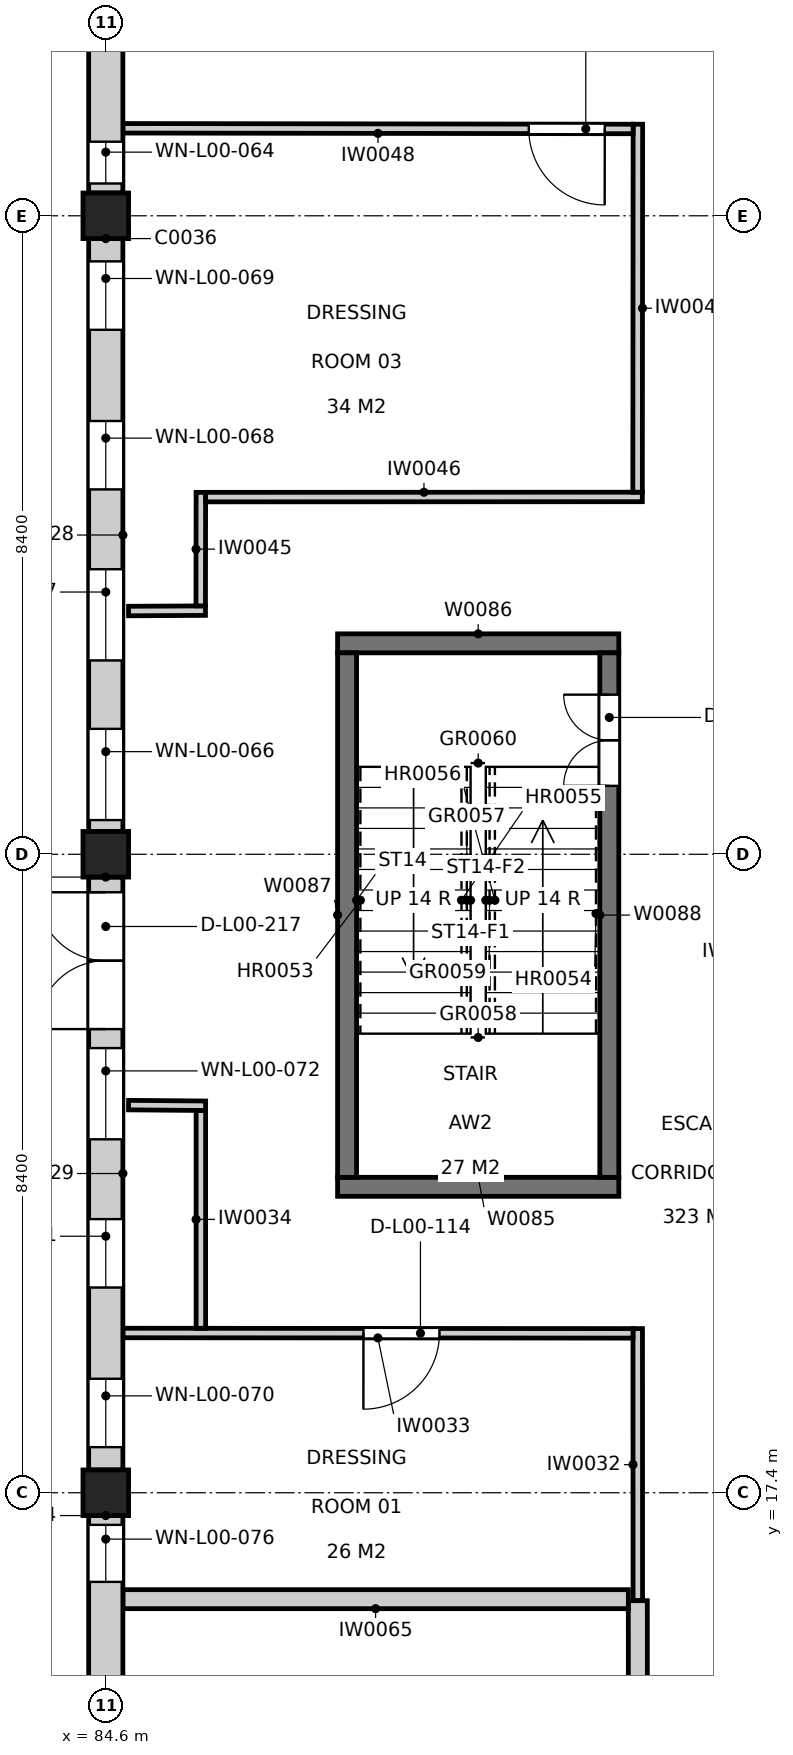
"""IFC4 building model, lengths in metres.
Left out: names, types, materials, properties, quantities, classifications, styles, units other than length and angle.
Written with IfcOpenShell. Run it as: python <this file> out.ifc"""

import sys

from ifc_helpers import new_model, si_unit, direction, frame, frame_2d, origin, origin_2d, place, context, subcontext, project, spatial, rectangle, extrude, element, fill, save


model = new_model("IFC4")
c1 = context("Model", 3, precision=1e-05, world=origin(), true_north=direction((0.0, 1.0)))
c2 = subcontext(c1, "Body", "Model", "MODEL_VIEW")
j1 = project(units=[si_unit("LENGTHUNIT", "METRE"), si_unit("PLANEANGLEUNIT", "RADIAN")], contexts=[c1])
p1 = place(None, origin())
s1 = spatial("IfcSite", under=j1, at=p1, CompositionType="ELEMENT")
p2 = place(p1, origin())
s2 = spatial("IfcBuilding", under=s1, at=p2, CompositionType="ELEMENT")
p3 = place(p2, origin())
s3 = spatial("IfcBuildingStorey", under=s2, at=p3, CompositionType="ELEMENT", Elevation=0.0)
for number, where, z_axis, x_axis in (
    (1, (84.6, 17.4, 0.0), (0.0, 0.0, 1.0), (1.0, 0.0, 0.0)),
    (2, (84.6, 25.8, 0.0), (0.0, 0.0, 1.0), (1.0, 0.0, 0.0)),
    (3, (84.6, 34.2, 0.0), (0.0, 0.0, 1.0), (1.0, 0.0, 0.0)),
):
    element("IfcColumn", number, at=place(p3, frame(where, z_axis=z_axis, x_axis=x_axis)), inside=s3, PredefinedType="COLUMN", context=c2, shape_type="SweptSolid", body=[
        extrude(rectangle(XDim=0.6, YDim=0.6, at=origin_2d()), origin(), (0.0, 0.0, 1.0), 4.8),
    ])
for number, where, z_axis, x_axis in (
    (4, (87.65, 21.425, 0.0), (0.0, 0.0, 1.0), (1.0, 0.0, 0.0)),
    (5, (87.65, 28.575, 0.0), (0.0, 0.0, 1.0), (1.0, 0.0, 0.0)),
):
    element("IfcWall", number, at=place(p3, frame(where, z_axis=z_axis, x_axis=x_axis)), inside=s3, PredefinedType="SOLIDWALL", context=c2, shape_type="SweptSolid", body=[
        extrude(rectangle(XDim=3.7, YDim=0.25, at=frame_2d((1.85, 0.0))), origin(), (0.0, 0.0, 1.0), 4.8),
    ])
p4 = place(p3, frame((87.775, 21.55, 0.0), z_axis=(0.0, 0.0, 1.0), x_axis=(0.0, 1.0, 0.0)))
e6 = element("IfcWall", 6, at=p4, inside=s3, PredefinedType="SOLIDWALL", context=c2, shape_type="SweptSolid", body=[
    extrude(rectangle(XDim=6.9, YDim=0.25, at=frame_2d((3.45, 0.0))), origin(), (0.0, 0.0, 1.0), 4.8),
])
p5 = place(p3, frame((91.225, 21.55, 0.0), z_axis=(0.0, 0.0, 1.0), x_axis=(0.0, 1.0, 0.0)))
e7 = element("IfcWall", 7, at=p5, inside=s3, PredefinedType="SOLIDWALL", context=c2, shape_type="SweptSolid", body=[
    extrude(rectangle(XDim=6.9, YDim=0.25, at=frame_2d((3.45, 0.0))), origin(), (0.0, 0.0, 1.0), 4.8),
])
p6 = place(p5, frame((5.15, 0.0, 0.0)))
e8 = element("IfcOpeningElement", 8, at=p6, cuts=e7, PredefinedType="OPENING", context=c2, shape_type="SweptSolid", body=[
    extrude(rectangle(XDim=1.2, YDim=2.1, at=frame_2d((0.6, 1.05))), frame((0.0, 0.135, 0.0), z_axis=(0.0, -1.0, 0.0), x_axis=(1.0, 0.0, 0.0)), (0.0, 0.0, 1.0), 0.27),
])
p7 = place(p3, frame((91.6, 15.98, 0.0), z_axis=(0.0, 0.0, 1.0), x_axis=(-0.000341017577, 0.999999941854, 0.0)))
e9 = element("IfcWall", 9, at=p7, inside=s3, PredefinedType="PARTITIONING", context=c2, shape_type="SweptSolid", body=[
    extrude(rectangle(XDim=3.58, YDim=0.125, at=frame_2d((1.79, 0.0))), origin(), (0.0, 0.0, 1.0), 3.84),
])
p8 = place(p3, frame((91.537, 19.497, 0.0), z_axis=(0.0, 0.0, 1.0), x_axis=(-0.999999761149, 0.000691160257, 0.0)))
e10 = element("IfcWall", 10, at=p8, inside=s3, PredefinedType="PARTITIONING", context=c2, shape_type="SweptSolid", body=[
    extrude(rectangle(XDim=6.711, YDim=0.125, at=frame_2d((3.356, 0.0))), origin(), (0.0, 0.0, 1.0), 4.64),
])
p9 = place(p8, frame((2.546, 0.0, 0.0)))
e11 = element("IfcOpeningElement", 11, at=p9, cuts=e10, PredefinedType="OPENING", context=c2, shape_type="SweptSolid", body=[
    extrude(rectangle(XDim=1.0, YDim=2.1, at=frame_2d((0.5, 1.05))), frame((0.0, 0.073, 0.0), z_axis=(0.0, -1.0, 0.0), x_axis=(1.0, 0.0, 0.0)), (0.0, 0.0, 1.0), 0.145),
])
p10 = place(p3, frame((85.851, 19.563, 0.0), z_axis=(0.0, 0.0, 1.0), x_axis=(0.0, 1.0, 0.0)))
e12 = element("IfcWall", 12, at=p10, inside=s3, PredefinedType="PARTITIONING", context=c2, shape_type="SweptSolid", body=[
    extrude(rectangle(XDim=2.866, YDim=0.125, at=frame_2d((1.433, 0.0))), origin(), (0.0, 0.0, 1.0), 3.94),
])
p11 = place(p3, frame((85.914, 22.491, 0.0), z_axis=(0.0, 0.0, 1.0), x_axis=(-0.999964472205, 0.008429372959, 0.0)))
e13 = element("IfcWall", 13, at=p11, inside=s3, PredefinedType="PARTITIONING", context=c2, shape_type="SweptSolid", body=[
    extrude(rectangle(XDim=1.014, YDim=0.125, at=frame_2d((0.507, 0.0))), origin(), (0.0, 0.0, 1.0), 4.64),
])
p12 = place(p3, frame((91.601, 12.634, 0.0), z_axis=(0.0, 0.0, 1.0), x_axis=(-0.000291864271, 0.999999957408, 0.0)))
e14 = element("IfcWall", 14, at=p12, inside=s3, PredefinedType="PARTITIONING", context=c2, shape_type="SweptSolid", body=[
    extrude(rectangle(XDim=3.346, YDim=0.25, at=frame_2d((1.673, 0.0))), origin(), (0.0, 0.0, 1.0), 3.94),
])
p13 = place(p3, frame((84.9, 29.0, 0.0), z_axis=(0.0, 0.0, 1.0), x_axis=(0.999985908193, 0.005308805497, 0.0)))
e15 = element("IfcWall", 15, at=p13, inside=s3, PredefinedType="PARTITIONING", context=c2, shape_type="SweptSolid", body=[
    extrude(rectangle(XDim=1.012, YDim=0.125, at=frame_2d((0.506, 0.0))), origin(), (0.0, 0.0, 1.0), 4.64),
])
p14 = place(p3, frame((85.849, 29.067, 0.0), z_axis=(0.0, 0.0, 1.0), x_axis=(0.001307188426, 0.999999145629, 0.0)))
e16 = element("IfcWall", 16, at=p14, inside=s3, PredefinedType="PARTITIONING", context=c2, shape_type="SweptSolid", body=[
    extrude(rectangle(XDim=1.494, YDim=0.125, at=frame_2d((0.747, 0.0))), origin(), (0.0, 0.0, 1.0), 4.64),
])
p15 = place(p3, frame((85.914, 30.499, 0.0), z_axis=(0.0, 0.0, 1.0), x_axis=(0.999999942227, 0.00033991925, 0.0)))
e17 = element("IfcWall", 17, at=p15, inside=s3, PredefinedType="PARTITIONING", context=c2, shape_type="SweptSolid", body=[
    extrude(rectangle(XDim=5.746, YDim=0.125, at=frame_2d((2.873, 0.0))), origin(), (0.0, 0.0, 1.0), 4.64),
])
p16 = place(p3, frame((91.597, 30.563, 0.0), z_axis=(0.0, 0.0, 1.0), x_axis=(0.000806898724, 0.999999674457, 0.0)))
e18 = element("IfcWall", 18, at=p16, inside=s3, PredefinedType="PARTITIONING", context=c2, shape_type="SweptSolid", body=[
    extrude(rectangle(XDim=4.841, YDim=0.125, at=frame_2d((2.42, 0.0))), origin(), (0.0, 0.0, 1.0), 3.84),
])
p17 = place(p3, frame((91.539, 35.342, 0.0), z_axis=(0.0, 0.0, 1.0), x_axis=(-0.999999094746, 0.001345551186, 0.0)))
e19 = element("IfcWall", 19, at=p17, inside=s3, PredefinedType="PARTITIONING", context=c2, shape_type="SweptSolid", body=[
    extrude(rectangle(XDim=6.713, YDim=0.125, at=frame_2d((3.357, 0.0))), origin(), (0.0, 0.0, 1.0), 4.64),
])
p18 = place(p17, frame((0.373, 0.0, 0.0)))
e20 = element("IfcOpeningElement", 20, at=p18, cuts=e19, PredefinedType="OPENING", context=c2, shape_type="SweptSolid", body=[
    extrude(rectangle(XDim=1.0, YDim=2.1, at=frame_2d((0.5, 1.05))), frame((0.0, 0.073, 0.0), z_axis=(0.0, -1.0, 0.0), x_axis=(1.0, 0.0, 0.0)), (0.0, 0.0, 1.0), 0.145),
])
p19 = place(p3, frame((91.475, 16.0, 0.0), z_axis=(0.0, 0.0, 1.0), x_axis=(-1.0, 0.0, 0.0)))
e21 = element("IfcWall", 21, at=p19, inside=s3, PredefinedType="PARTITIONING", context=c2, shape_type="SweptSolid", body=[
    extrude(rectangle(XDim=6.65, YDim=0.25, at=frame_2d((3.325, 0.0))), origin(), (0.0, 0.0, 1.0), 4.64),
])
p20 = place(p3, frame((84.6, 42.3, 0.0), z_axis=(0.0, 0.0, 1.0), x_axis=(0.0, -1.0, 0.0)))
e22 = element("IfcWall", 22, at=p20, inside=s3, PredefinedType="SOLIDWALL", context=c2, shape_type="SweptSolid", body=[
    extrude(rectangle(XDim=7.8, YDim=0.45, at=frame_2d((3.9, 0.0))), origin(), (0.0, 0.0, 1.0), 3.84),
])
p21 = place(p20, frame((2.4, 0.0, 0.0)))
e23 = element("IfcOpeningElement", 23, at=p21, cuts=e22, PredefinedType="OPENING", context=c2, shape_type="SweptSolid", body=[
    extrude(rectangle(XDim=1.8, YDim=2.1, at=frame_2d((0.9, 1.05))), frame((0.0, 0.235, 0.0), z_axis=(0.0, -1.0, 0.0), x_axis=(1.0, 0.0, 0.0)), (0.0, 0.0, 1.0), 0.47),
])
p22 = place(p20, frame((7.125, 0.0, 1.8)))
e24 = element("IfcOpeningElement", 24, at=p22, cuts=e22, PredefinedType="OPENING", context=c2, shape_type="SweptSolid", body=[
    extrude(rectangle(XDim=0.55, YDim=0.6, at=frame_2d((0.275, 0.3))), frame((0.0, 0.235, 0.0), z_axis=(0.0, -1.0, 0.0), x_axis=(1.0, 0.0, 0.0)), (0.0, 0.0, 1.0), 0.47),
])
p23 = place(p20, frame((0.15, 0.0, 0.9)))
e25 = element("IfcOpeningElement", 25, at=p23, cuts=e22, PredefinedType="OPENING", context=c2, shape_type="SweptSolid", body=[
    extrude(rectangle(XDim=1.2, YDim=2.4, at=frame_2d((0.6, 1.2))), frame((0.0, 0.235, 0.0), z_axis=(0.0, -1.0, 0.0), x_axis=(1.0, 0.0, 0.0)), (0.0, 0.0, 1.0), 0.47),
])
p24 = place(p3, frame((84.6, 33.9, 0.0), z_axis=(0.0, 0.0, 1.0), x_axis=(0.0, -1.0, 0.0)))
e26 = element("IfcWall", 26, at=p24, inside=s3, PredefinedType="SOLIDWALL", context=c2, shape_type="SweptSolid", body=[
    extrude(rectangle(XDim=7.8, YDim=0.45, at=frame_2d((3.9, 0.0))), origin(), (0.0, 0.0, 1.0), 3.84),
])
p25 = place(p24, frame((6.45, 0.0, 0.9)))
e27 = element("IfcOpeningElement", 27, at=p25, cuts=e26, PredefinedType="OPENING", context=c2, shape_type="SweptSolid", body=[
    extrude(rectangle(XDim=1.2, YDim=2.4, at=frame_2d((0.6, 1.2))), frame((0.0, 0.235, 0.0), z_axis=(0.0, -1.0, 0.0), x_axis=(1.0, 0.0, 0.0)), (0.0, 0.0, 1.0), 0.47),
])
p26 = place(p24, frame((4.35, 0.0, 0.9)))
e28 = element("IfcOpeningElement", 28, at=p26, cuts=e26, PredefinedType="OPENING", context=c2, shape_type="SweptSolid", body=[
    extrude(rectangle(XDim=1.2, YDim=2.4, at=frame_2d((0.6, 1.2))), frame((0.0, 0.235, 0.0), z_axis=(0.0, -1.0, 0.0), x_axis=(1.0, 0.0, 0.0)), (0.0, 0.0, 1.0), 0.47),
])
p27 = place(p24, frame((2.4, 0.0, 1.8)))
e29 = element("IfcOpeningElement", 29, at=p27, cuts=e26, PredefinedType="OPENING", context=c2, shape_type="SweptSolid", body=[
    extrude(rectangle(XDim=0.9, YDim=0.6, at=frame_2d((0.45, 0.3))), frame((0.0, 0.235, 0.0), z_axis=(0.0, -1.0, 0.0), x_axis=(1.0, 0.0, 0.0)), (0.0, 0.0, 1.0), 0.47),
])
p28 = place(p24, frame((0.3, 0.0, 1.8)))
e30 = element("IfcOpeningElement", 30, at=p28, cuts=e26, PredefinedType="OPENING", context=c2, shape_type="SweptSolid", body=[
    extrude(rectangle(XDim=0.9, YDim=0.6, at=frame_2d((0.45, 0.3))), frame((0.0, 0.235, 0.0), z_axis=(0.0, -1.0, 0.0), x_axis=(1.0, 0.0, 0.0)), (0.0, 0.0, 1.0), 0.47),
])
p29 = place(p3, frame((84.6, 25.5, 0.0), z_axis=(0.0, 0.0, 1.0), x_axis=(0.0, -1.0, 0.0)))
e31 = element("IfcWall", 31, at=p29, inside=s3, PredefinedType="SOLIDWALL", context=c2, shape_type="SweptSolid", body=[
    extrude(rectangle(XDim=7.8, YDim=0.45, at=frame_2d((3.9, 0.0))), origin(), (0.0, 0.0, 1.0), 3.84),
])
p30 = place(p29, frame((2.0, 0.0, 0.0), z_axis=(0.0, 0.0, 1.0), x_axis=(-1.0, 0.0, 0.0)))
e32 = element("IfcOpeningElement", 32, at=p30, cuts=e31, PredefinedType="OPENING", context=c2, shape_type="SweptSolid", body=[
    extrude(rectangle(XDim=1.8, YDim=2.1, at=frame_2d((0.9, 1.05))), frame((0.0, 0.235, 0.0), z_axis=(0.0, -1.0, 0.0), x_axis=(1.0, 0.0, 0.0)), (0.0, 0.0, 1.0), 0.47),
])
p31 = place(p29, frame((6.6, 0.0, 1.8)))
e33 = element("IfcOpeningElement", 33, at=p31, cuts=e31, PredefinedType="OPENING", context=c2, shape_type="SweptSolid", body=[
    extrude(rectangle(XDim=0.9, YDim=0.6, at=frame_2d((0.45, 0.3))), frame((0.0, 0.235, 0.0), z_axis=(0.0, -1.0, 0.0), x_axis=(1.0, 0.0, 0.0)), (0.0, 0.0, 1.0), 0.47),
])
p32 = place(p29, frame((4.5, 0.0, 1.8)))
e34 = element("IfcOpeningElement", 34, at=p32, cuts=e31, PredefinedType="OPENING", context=c2, shape_type="SweptSolid", body=[
    extrude(rectangle(XDim=0.9, YDim=0.6, at=frame_2d((0.45, 0.3))), frame((0.0, 0.235, 0.0), z_axis=(0.0, -1.0, 0.0), x_axis=(1.0, 0.0, 0.0)), (0.0, 0.0, 1.0), 0.47),
])
p33 = place(p29, frame((2.25, 0.0, 0.9)))
e35 = element("IfcOpeningElement", 35, at=p33, cuts=e31, PredefinedType="OPENING", context=c2, shape_type="SweptSolid", body=[
    extrude(rectangle(XDim=1.2, YDim=2.4, at=frame_2d((0.6, 1.2))), frame((0.0, 0.235, 0.0), z_axis=(0.0, -1.0, 0.0), x_axis=(1.0, 0.0, 0.0)), (0.0, 0.0, 1.0), 0.47),
])
p34 = place(p3, frame((84.6, 17.1, 0.0), z_axis=(0.0, 0.0, 1.0), x_axis=(0.0, -1.0, 0.0)))
e36 = element("IfcWall", 36, at=p34, inside=s3, PredefinedType="SOLIDWALL", context=c2, shape_type="SweptSolid", body=[
    extrude(rectangle(XDim=7.8, YDim=0.45, at=frame_2d((3.9, 0.0))), origin(), (0.0, 0.0, 1.0), 3.84),
])
p35 = place(p34, frame((6.45, 0.0, 0.9)))
e37 = element("IfcOpeningElement", 37, at=p35, cuts=e36, PredefinedType="OPENING", context=c2, shape_type="SweptSolid", body=[
    extrude(rectangle(XDim=1.2, YDim=2.4, at=frame_2d((0.6, 1.2))), frame((0.0, 0.235, 0.0), z_axis=(0.0, -1.0, 0.0), x_axis=(1.0, 0.0, 0.0)), (0.0, 0.0, 1.0), 0.47),
])
p36 = place(p34, frame((4.35, 0.0, 0.9)))
e38 = element("IfcOpeningElement", 38, at=p36, cuts=e36, PredefinedType="OPENING", context=c2, shape_type="SweptSolid", body=[
    extrude(rectangle(XDim=1.2, YDim=2.4, at=frame_2d((0.6, 1.2))), frame((0.0, 0.235, 0.0), z_axis=(0.0, -1.0, 0.0), x_axis=(1.0, 0.0, 0.0)), (0.0, 0.0, 1.0), 0.47),
])
p37 = place(p34, frame((2.25, 0.0, 0.9)))
e39 = element("IfcOpeningElement", 39, at=p37, cuts=e36, PredefinedType="OPENING", context=c2, shape_type="SweptSolid", body=[
    extrude(rectangle(XDim=1.2, YDim=2.4, at=frame_2d((0.6, 1.2))), frame((0.0, 0.235, 0.0), z_axis=(0.0, -1.0, 0.0), x_axis=(1.0, 0.0, 0.0)), (0.0, 0.0, 1.0), 0.47),
])
p38 = place(p34, frame((0.122, 0.0, 1.8)))
e40 = element("IfcOpeningElement", 40, at=p38, cuts=e36, PredefinedType="OPENING", context=c2, shape_type="SweptSolid", body=[
    extrude(rectangle(XDim=0.75, YDim=0.6, at=frame_2d((0.375, 0.3))), frame((0.0, 0.235, 0.0), z_axis=(0.0, -1.0, 0.0), x_axis=(1.0, 0.0, 0.0)), (0.0, 0.0, 1.0), 0.47),
])
p39 = place(p9, origin())
e41 = element("IfcDoor", 41, at=p39, inside=s3, OperationType="SINGLE_SWING_RIGHT", PredefinedType="DOOR", context=c2, shape_type="SweptSolid", body=[
    extrude(rectangle(XDim=1.0, YDim=2.1, at=frame_2d((0.5, 1.05))), frame((0.0, 0.025, 0.0), z_axis=(0.0, -1.0, 0.0), x_axis=(1.0, 0.0, 0.0)), (0.0, 0.0, 1.0), 0.05),
])
fill(e11, e41)
p40 = place(p18, origin())
e42 = element("IfcDoor", 42, at=p40, inside=s3, OperationType="SINGLE_SWING_LEFT", PredefinedType="DOOR", context=c2, shape_type="SweptSolid", body=[
    extrude(rectangle(XDim=1.0, YDim=2.1, at=frame_2d((0.5, 1.05))), frame((0.0, 0.025, 0.0), z_axis=(0.0, -1.0, 0.0), x_axis=(1.0, 0.0, 0.0)), (0.0, 0.0, 1.0), 0.05),
])
fill(e20, e42)
p41 = place(p6, origin())
e43 = element("IfcDoor", 43, at=p41, inside=s3, OperationType="DOUBLE_DOOR_SINGLE_SWING", PredefinedType="DOOR", context=c2, shape_type="SweptSolid", body=[
    extrude(rectangle(XDim=1.2, YDim=2.1, at=frame_2d((0.6, 1.05))), frame((0.0, 0.025, 0.0), z_axis=(0.0, -1.0, 0.0), x_axis=(1.0, 0.0, 0.0)), (0.0, 0.0, 1.0), 0.05),
])
fill(e8, e43)
p42 = place(p30, origin())
e44 = element("IfcDoor", 44, at=p42, inside=s3, OperationType="DOUBLE_DOOR_SINGLE_SWING", PredefinedType="DOOR", context=c2, shape_type="SweptSolid", body=[
    extrude(rectangle(XDim=1.8, YDim=2.1, at=frame_2d((0.9, 1.05))), frame((0.0, 0.025, 0.0), z_axis=(0.0, -1.0, 0.0), x_axis=(1.0, 0.0, 0.0)), (0.0, 0.0, 1.0), 0.05),
])
fill(e32, e44)
p43 = place(p22, origin())
e45 = element("IfcWindow", 45, at=p43, inside=s3, PartitioningType="SINGLE_PANEL", PredefinedType="WINDOW", context=c2, shape_type="SweptSolid", body=[
    extrude(rectangle(XDim=0.55, YDim=0.6, at=frame_2d((0.275, 0.3))), frame((0.0, 0.035, 0.0), z_axis=(0.0, -1.0, 0.0), x_axis=(1.0, 0.0, 0.0)), (0.0, 0.0, 1.0), 0.06),
])
fill(e24, e45)
p44 = place(p25, origin())
e46 = element("IfcWindow", 46, at=p44, inside=s3, PartitioningType="SINGLE_PANEL", PredefinedType="WINDOW", context=c2, shape_type="SweptSolid", body=[
    extrude(rectangle(XDim=1.2, YDim=2.4, at=frame_2d((0.6, 1.2))), frame((0.0, 0.135, 0.0), z_axis=(0.0, -1.0, 0.0), x_axis=(1.0, 0.0, 0.0)), (0.0, 0.0, 1.0), 0.06),
])
fill(e27, e46)
p45 = place(p26, origin())
e47 = element("IfcWindow", 47, at=p45, inside=s3, PartitioningType="SINGLE_PANEL", PredefinedType="WINDOW", context=c2, shape_type="SweptSolid", body=[
    extrude(rectangle(XDim=1.2, YDim=2.4, at=frame_2d((0.6, 1.2))), frame((0.0, 0.135, 0.0), z_axis=(0.0, -1.0, 0.0), x_axis=(1.0, 0.0, 0.0)), (0.0, 0.0, 1.0), 0.06),
])
fill(e28, e47)
p46 = place(p27, origin())
e48 = element("IfcWindow", 48, at=p46, inside=s3, PartitioningType="SINGLE_PANEL", PredefinedType="WINDOW", context=c2, shape_type="SweptSolid", body=[
    extrude(rectangle(XDim=0.9, YDim=0.6, at=frame_2d((0.45, 0.3))), frame((0.0, 0.035, 0.0), z_axis=(0.0, -1.0, 0.0), x_axis=(1.0, 0.0, 0.0)), (0.0, 0.0, 1.0), 0.06),
])
fill(e29, e48)
p47 = place(p28, origin())
e49 = element("IfcWindow", 49, at=p47, inside=s3, PartitioningType="SINGLE_PANEL", PredefinedType="WINDOW", context=c2, shape_type="SweptSolid", body=[
    extrude(rectangle(XDim=0.9, YDim=0.6, at=frame_2d((0.45, 0.3))), frame((0.0, 0.035, 0.0), z_axis=(0.0, -1.0, 0.0), x_axis=(1.0, 0.0, 0.0)), (0.0, 0.0, 1.0), 0.06),
])
fill(e30, e49)
p48 = place(p31, origin())
e50 = element("IfcWindow", 50, at=p48, inside=s3, PartitioningType="SINGLE_PANEL", PredefinedType="WINDOW", context=c2, shape_type="SweptSolid", body=[
    extrude(rectangle(XDim=0.9, YDim=0.6, at=frame_2d((0.45, 0.3))), frame((0.0, 0.035, 0.0), z_axis=(0.0, -1.0, 0.0), x_axis=(1.0, 0.0, 0.0)), (0.0, 0.0, 1.0), 0.06),
])
fill(e33, e50)
p49 = place(p32, origin())
e51 = element("IfcWindow", 51, at=p49, inside=s3, PartitioningType="SINGLE_PANEL", PredefinedType="WINDOW", context=c2, shape_type="SweptSolid", body=[
    extrude(rectangle(XDim=0.9, YDim=0.6, at=frame_2d((0.45, 0.3))), frame((0.0, 0.035, 0.0), z_axis=(0.0, -1.0, 0.0), x_axis=(1.0, 0.0, 0.0)), (0.0, 0.0, 1.0), 0.06),
])
fill(e34, e51)
p50 = place(p33, origin())
e52 = element("IfcWindow", 52, at=p50, inside=s3, PartitioningType="SINGLE_PANEL", PredefinedType="WINDOW", context=c2, shape_type="SweptSolid", body=[
    extrude(rectangle(XDim=1.2, YDim=2.4, at=frame_2d((0.6, 1.2))), frame((0.0, 0.135, 0.0), z_axis=(0.0, -1.0, 0.0), x_axis=(1.0, 0.0, 0.0)), (0.0, 0.0, 1.0), 0.06),
])
fill(e35, e52)
p51 = place(p38, origin())
e53 = element("IfcWindow", 53, at=p51, inside=s3, PartitioningType="SINGLE_PANEL", PredefinedType="WINDOW", context=c2, shape_type="SweptSolid", body=[
    extrude(rectangle(XDim=0.75, YDim=0.6, at=frame_2d((0.375, 0.3))), frame((0.0, 0.035, 0.0), z_axis=(0.0, -1.0, 0.0), x_axis=(1.0, 0.0, 0.0)), (0.0, 0.0, 1.0), 0.06),
])
fill(e40, e53)
save(model, sys.argv[1])
